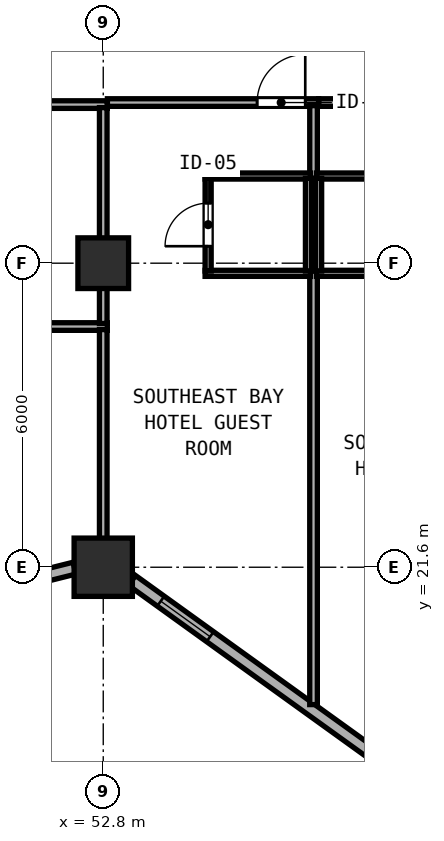
"""IFC4 building model, lengths in metres.
Left out: names, types, materials, properties, quantities, classifications, styles, units other than length and angle.
Written with IfcOpenShell. Run it as: python <this file> out.ifc"""

import sys

from ifc_helpers import new_model, si_unit, direction, frame, frame_2d, origin, origin_2d, place, context, subcontext, project, spatial, rectangle, hollow_rectangle, extrude, element, fill, save


model = new_model("IFC4")
c1 = context("Model", 3, precision=1e-05, world=origin(), true_north=direction((0.0, 1.0)))
c2 = subcontext(c1, "Body", "Model", "MODEL_VIEW")
j1 = project(units=[si_unit("LENGTHUNIT", "METRE"), si_unit("PLANEANGLEUNIT", "RADIAN")], contexts=[c1])
p1 = place(None, origin())
s1 = spatial("IfcSite", under=j1, at=p1, CompositionType="ELEMENT")
p2 = place(p1, origin())
s2 = spatial("IfcBuilding", under=s1, at=p2, CompositionType="ELEMENT")
p3 = place(p2, frame((0.0, 0.0, 81.8)))
s3 = spatial("IfcBuildingStorey", under=s2, at=p3, CompositionType="ELEMENT", Elevation=81.8)
p4 = place(p3, frame((52.8, 21.6, 0.0), z_axis=(0.0, 0.0, 1.0), x_axis=(1.0, 0.0, 0.0)))
e1 = element("IfcColumn", 1, at=p4, inside=s3, PredefinedType="COLUMN", context=c2, shape_type="SweptSolid", body=[
    extrude(hollow_rectangle(XDim=1.15, YDim=1.15, WallThickness=0.042, at=origin_2d()), origin(), (0.0, 0.0, 1.0), 3.8),
])
p5 = place(p3, frame((52.8, 27.6, 0.0), z_axis=(0.0, 0.0, 1.0), x_axis=(1.0, 0.0, 0.0)))
e2 = element("IfcColumn", 2, at=p5, inside=s3, PredefinedType="COLUMN", context=c2, shape_type="SweptSolid", body=[
    extrude(hollow_rectangle(XDim=1.0, YDim=1.0, WallThickness=0.038, at=origin_2d()), origin(), (0.0, 0.0, 1.0), 3.8),
])
p6 = place(p3, frame((47.932, 20.507, 0.0), z_axis=(0.0, 0.0, 1.0), x_axis=(0.970145739396, 0.242522667667, 0.0)))
e3 = element("IfcWall", 3, at=p6, inside=s3, PredefinedType="SOLIDWALL", context=c2, shape_type="SweptSolid", body=[
    extrude(rectangle(XDim=4.433, YDim=0.24, at=frame_2d((2.217, 0.0))), origin(), (0.0, 0.0, 1.0), 3.097),
])
p7 = place(p6, frame((1.156, 0.0, 0.85)))
e4 = element("IfcOpeningElement", 4, at=p7, cuts=e3, PredefinedType="OPENING", context=c2, shape_type="SweptSolid", body=[
    extrude(rectangle(XDim=1.2, YDim=1.85, at=frame_2d((0.6, 0.925))), frame((0.0, 0.13, 0.0), z_axis=(0.0, -1.0, 0.0), x_axis=(1.0, 0.0, 0.0)), (0.0, 0.0, 1.0), 0.26),
])
p8 = place(p3, frame((53.367, 21.34, 0.0), z_axis=(0.0, 0.0, 1.0), x_axis=(0.811543176492, -0.58429245476, 0.0)))
e5 = element("IfcWall", 5, at=p8, inside=s3, PredefinedType="SOLIDWALL", context=c2, shape_type="SweptSolid", body=[
    extrude(rectangle(XDim=11.531, YDim=0.24, at=frame_2d((5.765, 0.0))), origin(), (0.0, 0.0, 1.0), 3.097),
])
p9 = place(p8, frame((0.7, 0.0, 0.85)))
e6 = element("IfcOpeningElement", 6, at=p9, cuts=e5, PredefinedType="OPENING", context=c2, shape_type="SweptSolid", body=[
    extrude(rectangle(XDim=1.2, YDim=1.85, at=frame_2d((0.6, 0.925))), frame((0.0, 0.13, 0.0), z_axis=(0.0, -1.0, 0.0), x_axis=(1.0, 0.0, 0.0)), (0.0, 0.0, 1.0), 0.26),
])
p10 = place(p8, frame((6.1, 0.0, 0.85)))
e7 = element("IfcOpeningElement", 7, at=p10, cuts=e5, PredefinedType="OPENING", context=c2, shape_type="SweptSolid", body=[
    extrude(rectangle(XDim=1.2, YDim=1.85, at=frame_2d((0.6, 0.925))), frame((0.0, 0.13, 0.0), z_axis=(0.0, -1.0, 0.0), x_axis=(1.0, 0.0, 0.0)), (0.0, 0.0, 1.0), 0.26),
])
p11 = place(p8, frame((9.842, 0.0, 0.85)))
e8 = element("IfcOpeningElement", 8, at=p11, cuts=e5, PredefinedType="OPENING", context=c2, shape_type="SweptSolid", body=[
    extrude(rectangle(XDim=1.2, YDim=1.85, at=frame_2d((0.6, 0.925))), frame((0.0, 0.13, 0.0), z_axis=(0.0, -1.0, 0.0), x_axis=(1.0, 0.0, 0.0)), (0.0, 0.0, 1.0), 0.26),
])
for number, where, z_axis, x_axis in (
    (9, (49.08, 30.73, 0.0), (0.0, 0.0, 1.0), (1.0, 0.0, 0.0)),
    (10, (49.08, 26.35, 0.0), (0.0, 0.0, 1.0), (1.0, 0.0, 0.0)),
):
    element("IfcWall", number, at=place(p3, frame(where, z_axis=z_axis, x_axis=x_axis)), inside=s3, PredefinedType="PARTITIONING", context=c2, shape_type="SweptSolid", body=[
        extrude(rectangle(XDim=3.8, YDim=0.15, at=frame_2d((1.9, 0.0))), origin(), (0.0, 0.0, 1.0), 3.6),
    ])
p12 = place(p3, frame((52.8, 26.41, 0.0), z_axis=(0.0, 0.0, 1.0), x_axis=(0.0, 1.0, 0.0)))
e11 = element("IfcWall", 11, at=p12, inside=s3, PredefinedType="PARTITIONING", context=c2, shape_type="SweptSolid", body=[
    extrude(rectangle(XDim=4.26, YDim=0.15, at=frame_2d((2.13, 0.0))), origin(), (0.0, 0.0, 1.0), 3.097),
])
p13 = place(p3, frame((52.882, 30.77, 0.0), z_axis=(0.0, 0.0, 1.0), x_axis=(1.0, 0.0, 0.0)))
e12 = element("IfcWall", 12, at=p13, inside=s3, PredefinedType="PARTITIONING", context=c2, shape_type="SweptSolid", body=[
    extrude(rectangle(XDim=4.168, YDim=0.15, at=frame_2d((2.084, 0.0))), origin(), (0.0, 0.0, 1.0), 3.6),
])
p14 = place(p13, frame((3.905, 0.0, 0.0), z_axis=(0.0, 0.0, 1.0), x_axis=(-1.0, 0.0, 0.0)))
e13 = element("IfcOpeningElement", 13, at=p14, cuts=e12, PredefinedType="OPENING", context=c2, shape_type="SweptSolid", body=[
    extrude(rectangle(XDim=0.95, YDim=2.15, at=frame_2d((0.475, 1.075))), frame((0.0, 0.085, 0.0), z_axis=(0.0, -1.0, 0.0), x_axis=(1.0, 0.0, 0.0)), (0.0, 0.0, 1.0), 0.17),
])
p15 = place(p3, frame((52.8, 21.819, 0.0), z_axis=(0.0, 0.0, 1.0), x_axis=(0.0, 1.0, 0.0)))
e14 = element("IfcWall", 14, at=p15, inside=s3, PredefinedType="PARTITIONING", context=c2, shape_type="SweptSolid", body=[
    extrude(rectangle(XDim=4.471, YDim=0.15, at=frame_2d((2.236, 0.0))), origin(), (0.0, 0.0, 1.0), 3.097),
])
p16 = place(p3, frame((56.95, 18.889, 0.0), z_axis=(0.0, 0.0, 1.0), x_axis=(0.0, 1.0, 0.0)))
e15 = element("IfcWall", 15, at=p16, inside=s3, PredefinedType="PARTITIONING", context=c2, shape_type="SweptSolid", body=[
    extrude(rectangle(XDim=11.821, YDim=0.15, at=frame_2d((5.91, 0.0))), origin(), (0.0, 0.0, 1.0), 3.6),
])
p17 = place(p3, frame((54.81, 29.32, 0.0), z_axis=(0.0, 0.0, 1.0), x_axis=(1.0, 0.0, 0.0)))
e16 = element("IfcWall", 16, at=p17, inside=s3, PredefinedType="PARTITIONING", context=c2, shape_type="SweptSolid", body=[
    extrude(rectangle(XDim=2.08, YDim=0.12, at=frame_2d((1.04, 0.0))), origin(), (0.0, 0.0, 1.0), 3.6),
])
p18 = place(p3, frame((54.81, 27.4, 0.0), z_axis=(0.0, 0.0, 1.0), x_axis=(1.0, 0.0, 0.0)))
e17 = element("IfcWall", 17, at=p18, inside=s3, PredefinedType="PARTITIONING", context=c2, shape_type="SweptSolid", body=[
    extrude(rectangle(XDim=2.08, YDim=0.12, at=frame_2d((1.04, 0.0))), origin(), (0.0, 0.0, 1.0), 3.097),
])
p19 = place(p3, frame((54.87, 27.445, 0.0), z_axis=(0.0, 0.0, 1.0), x_axis=(0.0, 1.0, 0.0)))
e18 = element("IfcWall", 18, at=p19, inside=s3, PredefinedType="PARTITIONING", context=c2, shape_type="SweptSolid", body=[
    extrude(rectangle(XDim=1.83, YDim=0.12, at=frame_2d((0.915, 0.0))), origin(), (0.0, 0.0, 1.0), 3.6),
])
p20 = place(p19, frame((1.34, 0.0, 0.0), z_axis=(0.0, 0.0, 1.0), x_axis=(-1.0, 0.0, 0.0)))
e19 = element("IfcOpeningElement", 19, at=p20, cuts=e18, PredefinedType="OPENING", context=c2, shape_type="SweptSolid", body=[
    extrude(rectangle(XDim=0.85, YDim=2.1, at=frame_2d((0.425, 1.05))), frame((0.0, 0.07, 0.0), z_axis=(0.0, -1.0, 0.0), x_axis=(1.0, 0.0, 0.0)), (0.0, 0.0, 1.0), 0.14),
])
p21 = place(p3, frame((56.85, 27.445, 0.0), z_axis=(0.0, 0.0, 1.0), x_axis=(0.0, 1.0, 0.0)))
e20 = element("IfcWall", 20, at=p21, inside=s3, PredefinedType="PARTITIONING", context=c2, shape_type="SweptSolid", body=[
    extrude(rectangle(XDim=1.83, YDim=0.12, at=frame_2d((0.915, 0.0))), origin(), (0.0, 0.0, 1.0), 3.6),
])
p22 = place(p3, frame((57.052, 30.77, 0.0), z_axis=(0.0, 0.0, 1.0), x_axis=(1.0, 0.0, 0.0)))
e21 = element("IfcWall", 21, at=p22, inside=s3, PredefinedType="PARTITIONING", context=c2, shape_type="SweptSolid", body=[
    extrude(rectangle(XDim=4.148, YDim=0.15, at=frame_2d((2.074, 0.0))), origin(), (0.0, 0.0, 1.0), 3.6),
])
p23 = place(p22, frame((3.885, 0.0, 0.0), z_axis=(0.0, 0.0, 1.0), x_axis=(-1.0, 0.0, 0.0)))
e22 = element("IfcOpeningElement", 22, at=p23, cuts=e21, PredefinedType="OPENING", context=c2, shape_type="SweptSolid", body=[
    extrude(rectangle(XDim=0.95, YDim=2.15, at=frame_2d((0.475, 1.075))), frame((0.0, 0.085, 0.0), z_axis=(0.0, -1.0, 0.0), x_axis=(1.0, 0.0, 0.0)), (0.0, 0.0, 1.0), 0.17),
])
p24 = place(p3, frame((57.01, 29.32, 0.0), z_axis=(0.0, 0.0, 1.0), x_axis=(1.0, 0.0, 0.0)))
e23 = element("IfcWall", 23, at=p24, inside=s3, PredefinedType="PARTITIONING", context=c2, shape_type="SweptSolid", body=[
    extrude(rectangle(XDim=2.08, YDim=0.12, at=frame_2d((1.04, 0.0))), origin(), (0.0, 0.0, 1.0), 3.6),
])
p25 = place(p3, frame((57.01, 27.4, 0.0), z_axis=(0.0, 0.0, 1.0), x_axis=(1.0, 0.0, 0.0)))
e24 = element("IfcWall", 24, at=p25, inside=s3, PredefinedType="PARTITIONING", context=c2, shape_type="SweptSolid", body=[
    extrude(rectangle(XDim=2.08, YDim=0.12, at=frame_2d((1.04, 0.0))), origin(), (0.0, 0.0, 1.0), 3.097),
])
p26 = place(p3, frame((57.05, 27.445, 0.0), z_axis=(0.0, 0.0, 1.0), x_axis=(0.0, 1.0, 0.0)))
e25 = element("IfcWall", 25, at=p26, inside=s3, PredefinedType="PARTITIONING", context=c2, shape_type="SweptSolid", body=[
    extrude(rectangle(XDim=1.83, YDim=0.12, at=frame_2d((0.915, 0.0))), origin(), (0.0, 0.0, 1.0), 3.6),
])
p27 = place(p9, origin())
e26 = element("IfcWindow", 26, at=p27, inside=s3, PartitioningType="SINGLE_PANEL", PredefinedType="WINDOW", context=c2, shape_type="SweptSolid", body=[
    extrude(rectangle(XDim=1.2, YDim=1.85, at=frame_2d((0.6, 0.925))), frame((0.0, 0.03, 0.0), z_axis=(0.0, -1.0, 0.0), x_axis=(1.0, 0.0, 0.0)), (0.0, 0.0, 1.0), 0.06),
])
fill(e6, e26)
p28 = place(p14, origin())
e27 = element("IfcDoor", 27, at=p28, inside=s3, OperationType="SINGLE_SWING_LEFT", PredefinedType="DOOR", context=c2, shape_type="SweptSolid", body=[
    extrude(rectangle(XDim=0.95, YDim=2.15, at=frame_2d((0.475, 1.075))), frame((0.0, 0.025, 0.0), z_axis=(0.0, -1.0, 0.0), x_axis=(1.0, 0.0, 0.0)), (0.0, 0.0, 1.0), 0.05),
])
fill(e13, e27)
p29 = place(p20, origin())
e28 = element("IfcDoor", 28, at=p29, inside=s3, OperationType="SINGLE_SWING_RIGHT", PredefinedType="DOOR", context=c2, shape_type="SweptSolid", body=[
    extrude(rectangle(XDim=0.85, YDim=2.1, at=frame_2d((0.425, 1.05))), frame((0.0, 0.025, 0.0), z_axis=(0.0, -1.0, 0.0), x_axis=(1.0, 0.0, 0.0)), (0.0, 0.0, 1.0), 0.05),
])
fill(e19, e28)
save(model, sys.argv[1])
